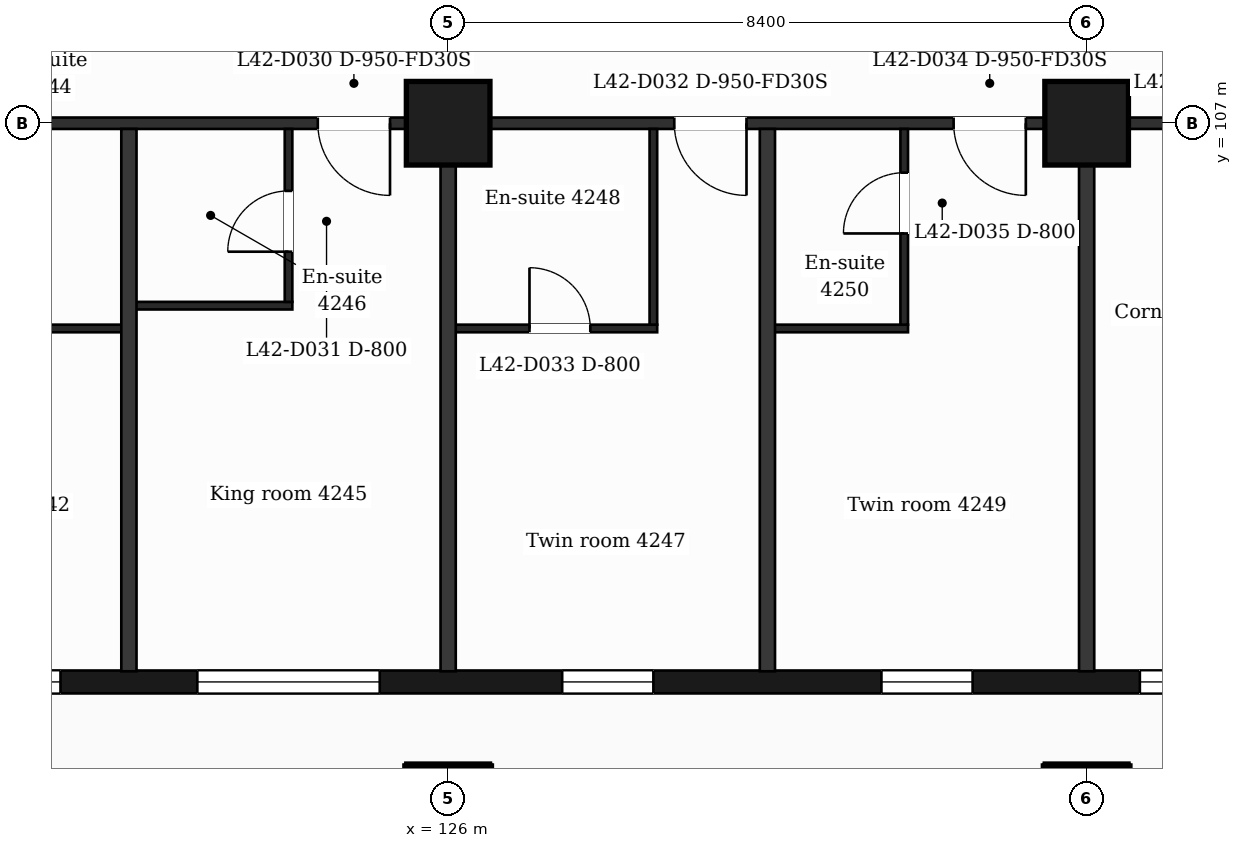
"""IFC4 building model, lengths in metres.
Left out: names, types, materials, properties, quantities, classifications, styles, units other than length and angle.
Written with IfcOpenShell. Run it as: python <this file> out.ifc"""

import sys

from ifc_helpers import new_model, si_unit, direction, frame, frame_2d, origin, origin_2d, place, context, subcontext, project, spatial, rectangle, extrude, element, fill, save


model = new_model("IFC4")
c1 = context("Model", 3, precision=1e-05, world=origin(), true_north=direction((0.0, 1.0)))
c2 = subcontext(c1, "Body", "Model", "MODEL_VIEW")
j1 = project(units=[si_unit("LENGTHUNIT", "METRE"), si_unit("PLANEANGLEUNIT", "RADIAN")], contexts=[c1])
p1 = place(None, origin())
s1 = spatial("IfcSite", under=j1, at=p1, CompositionType="ELEMENT")
p2 = place(p1, origin())
s2 = spatial("IfcBuilding", under=s1, at=p2, CompositionType="ELEMENT")
p3 = place(p2, frame((0.0, 0.0, 177.4)))
s3 = spatial("IfcBuildingStorey", under=s2, at=p3, CompositionType="ELEMENT", Elevation=177.4)
for number, where, z_axis, x_axis in (
    (1, (126.0, 98.0, 0.0), (0.0, 0.0, 1.0), (1.0, 0.0, 0.0)),
    (2, (134.4, 98.0, 0.0), (0.0, 0.0, 1.0), (1.0, 0.0, 0.0)),
    (3, (126.0, 107.0, 0.0), (0.0, 0.0, 1.0), (1.0, 0.0, 0.0)),
    (4, (134.4, 107.0, 0.0), (0.0, 0.0, 1.0), (1.0, 0.0, 0.0)),
):
    element("IfcColumn", number, at=place(p3, frame(where, z_axis=z_axis, x_axis=x_axis)), inside=s3, PredefinedType="COLUMN", context=c2, shape_type="SweptSolid", body=[
        extrude(rectangle(XDim=1.1, YDim=1.1, at=origin_2d()), origin(), (0.0, 0.0, 1.0), 3.7),
    ])
p4 = place(p3, frame((89.85, 99.65, 0.0), z_axis=(0.0, 0.0, 1.0), x_axis=(1.0, 0.0, 0.0)))
e5 = element("IfcWall", 5, at=p4, inside=s3, PredefinedType="SOLIDWALL", context=c2, shape_type="SweptSolid", body=[
    extrude(rectangle(XDim=47.25, YDim=0.3, at=frame_2d((23.625, 0.0))), origin(), (0.0, 0.0, 1.0), 3.38),
])
p5 = place(p4, frame((0.725, 0.0, 0.9)))
e6 = element("IfcOpeningElement", 6, at=p5, cuts=e5, PredefinedType="OPENING", context=c2, shape_type="SweptSolid", body=[
    extrude(rectangle(XDim=1.2, YDim=2.1, at=frame_2d((0.6, 1.05))), frame((0.0, 0.16, 0.0), z_axis=(0.0, -1.0, 0.0), x_axis=(1.0, 0.0, 0.0)), (0.0, 0.0, 1.0), 0.32),
])
p6 = place(p4, frame((3.45, 0.0, 0.9)))
e7 = element("IfcOpeningElement", 7, at=p6, cuts=e5, PredefinedType="OPENING", context=c2, shape_type="SweptSolid", body=[
    extrude(rectangle(XDim=2.4, YDim=2.1, at=frame_2d((1.2, 1.05))), frame((0.0, 0.16, 0.0), z_axis=(0.0, -1.0, 0.0), x_axis=(1.0, 0.0, 0.0)), (0.0, 0.0, 1.0), 0.32),
])
p7 = place(p4, frame((8.25, 0.0, 0.9)))
e8 = element("IfcOpeningElement", 8, at=p7, cuts=e5, PredefinedType="OPENING", context=c2, shape_type="SweptSolid", body=[
    extrude(rectangle(XDim=1.2, YDim=2.1, at=frame_2d((0.6, 1.05))), frame((0.0, 0.16, 0.0), z_axis=(0.0, -1.0, 0.0), x_axis=(1.0, 0.0, 0.0)), (0.0, 0.0, 1.0), 0.32),
])
p8 = place(p4, frame((12.45, 0.0, 0.9)))
e9 = element("IfcOpeningElement", 9, at=p8, cuts=e5, PredefinedType="OPENING", context=c2, shape_type="SweptSolid", body=[
    extrude(rectangle(XDim=1.2, YDim=2.1, at=frame_2d((0.6, 1.05))), frame((0.0, 0.16, 0.0), z_axis=(0.0, -1.0, 0.0), x_axis=(1.0, 0.0, 0.0)), (0.0, 0.0, 1.0), 0.32),
])
p9 = place(p4, frame((16.05, 0.0, 0.9)))
e10 = element("IfcOpeningElement", 10, at=p9, cuts=e5, PredefinedType="OPENING", context=c2, shape_type="SweptSolid", body=[
    extrude(rectangle(XDim=2.4, YDim=2.1, at=frame_2d((1.2, 1.05))), frame((0.0, 0.16, 0.0), z_axis=(0.0, -1.0, 0.0), x_axis=(1.0, 0.0, 0.0)), (0.0, 0.0, 1.0), 0.32),
])
p10 = place(p4, frame((20.25, 0.0, 0.9)))
e11 = element("IfcOpeningElement", 11, at=p10, cuts=e5, PredefinedType="OPENING", context=c2, shape_type="SweptSolid", body=[
    extrude(rectangle(XDim=2.4, YDim=2.1, at=frame_2d((1.2, 1.05))), frame((0.0, 0.16, 0.0), z_axis=(0.0, -1.0, 0.0), x_axis=(1.0, 0.0, 0.0)), (0.0, 0.0, 1.0), 0.32),
])
p11 = place(p4, frame((25.05, 0.0, 0.0)))
e12 = element("IfcOpeningElement", 12, at=p11, cuts=e5, PredefinedType="OPENING", context=c2, shape_type="SweptSolid", body=[
    extrude(rectangle(XDim=1.2, YDim=2.4, at=frame_2d((0.6, 1.2))), frame((0.0, 0.16, 0.0), z_axis=(0.0, -1.0, 0.0), x_axis=(1.0, 0.0, 0.0)), (0.0, 0.0, 1.0), 0.32),
])
p12 = place(p4, frame((28.65, 0.0, 0.9)))
e13 = element("IfcOpeningElement", 13, at=p12, cuts=e5, PredefinedType="OPENING", context=c2, shape_type="SweptSolid", body=[
    extrude(rectangle(XDim=2.4, YDim=2.1, at=frame_2d((1.2, 1.05))), frame((0.0, 0.16, 0.0), z_axis=(0.0, -1.0, 0.0), x_axis=(1.0, 0.0, 0.0)), (0.0, 0.0, 1.0), 0.32),
])
p13 = place(p4, frame((32.85, 0.0, 0.9)))
e14 = element("IfcOpeningElement", 14, at=p13, cuts=e5, PredefinedType="OPENING", context=c2, shape_type="SweptSolid", body=[
    extrude(rectangle(XDim=2.4, YDim=2.1, at=frame_2d((1.2, 1.05))), frame((0.0, 0.16, 0.0), z_axis=(0.0, -1.0, 0.0), x_axis=(1.0, 0.0, 0.0)), (0.0, 0.0, 1.0), 0.32),
])
p14 = place(p4, frame((37.65, 0.0, 0.9)))
e15 = element("IfcOpeningElement", 15, at=p14, cuts=e5, PredefinedType="OPENING", context=c2, shape_type="SweptSolid", body=[
    extrude(rectangle(XDim=1.2, YDim=2.1, at=frame_2d((0.6, 1.05))), frame((0.0, 0.16, 0.0), z_axis=(0.0, -1.0, 0.0), x_axis=(1.0, 0.0, 0.0)), (0.0, 0.0, 1.0), 0.32),
])
p15 = place(p4, frame((41.85, 0.0, 0.9)))
e16 = element("IfcOpeningElement", 16, at=p15, cuts=e5, PredefinedType="OPENING", context=c2, shape_type="SweptSolid", body=[
    extrude(rectangle(XDim=1.2, YDim=2.1, at=frame_2d((0.6, 1.05))), frame((0.0, 0.16, 0.0), z_axis=(0.0, -1.0, 0.0), x_axis=(1.0, 0.0, 0.0)), (0.0, 0.0, 1.0), 0.32),
])
p16 = place(p4, frame((45.25, 0.0, 0.9)))
e17 = element("IfcOpeningElement", 17, at=p16, cuts=e5, PredefinedType="OPENING", context=c2, shape_type="SweptSolid", body=[
    extrude(rectangle(XDim=1.2, YDim=2.1, at=frame_2d((0.6, 1.05))), frame((0.0, 0.16, 0.0), z_axis=(0.0, -1.0, 0.0), x_axis=(1.0, 0.0, 0.0)), (0.0, 0.0, 1.0), 0.32),
])
p17 = place(p3, frame((119.65, 104.3, 0.0), z_axis=(0.0, 0.0, 1.0), x_axis=(1.0, 0.0, 0.0)))
e18 = element("IfcWall", 18, at=p17, inside=s3, PredefinedType="PARTITIONING", context=c2, shape_type="SweptSolid", body=[
    extrude(rectangle(XDim=2.15, YDim=0.1, at=frame_2d((1.075, 0.0))), origin(), (0.0, 0.0, 1.0), 3.38),
])
p18 = place(p3, frame((126.0, 104.3, 0.0), z_axis=(0.0, 0.0, 1.0), x_axis=(1.0, 0.0, 0.0)))
e19 = element("IfcWall", 19, at=p18, inside=s3, PredefinedType="PARTITIONING", context=c2, shape_type="SweptSolid", body=[
    extrude(rectangle(XDim=2.75, YDim=0.1, at=frame_2d((1.375, 0.0))), origin(), (0.0, 0.0, 1.0), 3.38),
])
p19 = place(p18, frame((1.07, 0.0, 0.0)))
e20 = element("IfcOpeningElement", 20, at=p19, cuts=e19, PredefinedType="OPENING", context=c2, shape_type="SweptSolid", body=[
    extrude(rectangle(XDim=0.8, YDim=2.1, at=frame_2d((0.4, 1.05))), frame((0.0, 0.06, 0.0), z_axis=(0.0, -1.0, 0.0), x_axis=(1.0, 0.0, 0.0)), (0.0, 0.0, 1.0), 0.12),
])
p20 = place(p3, frame((130.2, 104.3, 0.0), z_axis=(0.0, 0.0, 1.0), x_axis=(1.0, 0.0, 0.0)))
e21 = element("IfcWall", 21, at=p20, inside=s3, PredefinedType="PARTITIONING", context=c2, shape_type="SweptSolid", body=[
    extrude(rectangle(XDim=1.85, YDim=0.1, at=frame_2d((0.925, 0.0))), origin(), (0.0, 0.0, 1.0), 3.38),
])
p21 = place(p3, frame((121.8, 104.6, 0.0), z_axis=(0.0, 0.0, 1.0), x_axis=(1.0, 0.0, 0.0)))
e22 = element("IfcWall", 22, at=p21, inside=s3, PredefinedType="PARTITIONING", context=c2, shape_type="SweptSolid", body=[
    extrude(rectangle(XDim=2.15, YDim=0.1, at=frame_2d((1.075, 0.0))), origin(), (0.0, 0.0, 1.0), 3.38),
])
p22 = place(p3, frame((87.018, 107.0, 0.0), z_axis=(0.0, 0.0, 1.0), x_axis=(1.0, 0.0, 0.0)))
e23 = element("IfcWall", 23, at=p22, inside=s3, PredefinedType="PARTITIONING", context=c2, shape_type="SweptSolid", body=[
    extrude(rectangle(XDim=52.765, YDim=0.15, at=frame_2d((26.382, 0.0))), origin(), (0.0, 0.0, 1.0), 3.38),
])
p23 = place(p22, frame((1.276, 0.0, 0.0)))
e24 = element("IfcOpeningElement", 24, at=p23, cuts=e23, PredefinedType="OPENING", context=c2, shape_type="SweptSolid", body=[
    extrude(rectangle(XDim=0.95, YDim=2.1, at=frame_2d((0.475, 1.05))), frame((0.0, 0.085, 0.0), z_axis=(0.0, -1.0, 0.0), x_axis=(1.0, 0.0, 0.0)), (0.0, 0.0, 1.0), 0.17),
])
p24 = place(p22, frame((8.357, 0.0, 0.0)))
e25 = element("IfcOpeningElement", 25, at=p24, cuts=e23, PredefinedType="OPENING", context=c2, shape_type="SweptSolid", body=[
    extrude(rectangle(XDim=0.95, YDim=2.1, at=frame_2d((0.475, 1.05))), frame((0.0, 0.085, 0.0), z_axis=(0.0, -1.0, 0.0), x_axis=(1.0, 0.0, 0.0)), (0.0, 0.0, 1.0), 0.17),
])
p25 = place(p22, frame((9.832, 0.0, 0.0)))
e26 = element("IfcOpeningElement", 26, at=p25, cuts=e23, PredefinedType="OPENING", context=c2, shape_type="SweptSolid", body=[
    extrude(rectangle(XDim=1.0, YDim=2.1, at=frame_2d((0.5, 1.05))), frame((0.0, 0.085, 0.0), z_axis=(0.0, -1.0, 0.0), x_axis=(1.0, 0.0, 0.0)), (0.0, 0.0, 1.0), 0.17),
])
p26 = place(p22, frame((14.547, 0.0, 0.0)))
e27 = element("IfcOpeningElement", 27, at=p26, cuts=e23, PredefinedType="OPENING", context=c2, shape_type="SweptSolid", body=[
    extrude(rectangle(XDim=0.95, YDim=2.1, at=frame_2d((0.475, 1.05))), frame((0.0, 0.085, 0.0), z_axis=(0.0, -1.0, 0.0), x_axis=(1.0, 0.0, 0.0)), (0.0, 0.0, 1.0), 0.17),
])
p27 = place(p22, frame((18.257, 0.0, 0.0)))
e28 = element("IfcOpeningElement", 28, at=p27, cuts=e23, PredefinedType="OPENING", context=c2, shape_type="SweptSolid", body=[
    extrude(rectangle(XDim=0.95, YDim=2.1, at=frame_2d((0.475, 1.05))), frame((0.0, 0.085, 0.0), z_axis=(0.0, -1.0, 0.0), x_axis=(1.0, 0.0, 0.0)), (0.0, 0.0, 1.0), 0.17),
])
p28 = place(p22, frame((25.212, 0.0, 0.0)))
e29 = element("IfcOpeningElement", 29, at=p28, cuts=e23, PredefinedType="OPENING", context=c2, shape_type="SweptSolid", body=[
    extrude(rectangle(XDim=1.0, YDim=2.1, at=frame_2d((0.5, 1.05))), frame((0.0, 0.085, 0.0), z_axis=(0.0, -1.0, 0.0), x_axis=(1.0, 0.0, 0.0)), (0.0, 0.0, 1.0), 0.17),
])
p29 = place(p22, frame((37.267, 0.0, 0.0)))
e30 = element("IfcOpeningElement", 30, at=p29, cuts=e23, PredefinedType="OPENING", context=c2, shape_type="SweptSolid", body=[
    extrude(rectangle(XDim=0.95, YDim=2.1, at=frame_2d((0.475, 1.05))), frame((0.0, 0.085, 0.0), z_axis=(0.0, -1.0, 0.0), x_axis=(1.0, 0.0, 0.0)), (0.0, 0.0, 1.0), 0.17),
])
p30 = place(p22, frame((41.957, 0.0, 0.0)))
e31 = element("IfcOpeningElement", 31, at=p30, cuts=e23, PredefinedType="OPENING", context=c2, shape_type="SweptSolid", body=[
    extrude(rectangle(XDim=0.95, YDim=2.1, at=frame_2d((0.475, 1.05))), frame((0.0, 0.085, 0.0), z_axis=(0.0, -1.0, 0.0), x_axis=(1.0, 0.0, 0.0)), (0.0, 0.0, 1.0), 0.17),
])
p31 = place(p22, frame((45.632, 0.0, 0.0)))
e32 = element("IfcOpeningElement", 32, at=p31, cuts=e23, PredefinedType="OPENING", context=c2, shape_type="SweptSolid", body=[
    extrude(rectangle(XDim=0.95, YDim=2.1, at=frame_2d((0.475, 1.05))), frame((0.0, 0.085, 0.0), z_axis=(0.0, -1.0, 0.0), x_axis=(1.0, 0.0, 0.0)), (0.0, 0.0, 1.0), 0.17),
])
p32 = place(p22, frame((48.767, 0.0, 0.0)))
e33 = element("IfcOpeningElement", 33, at=p32, cuts=e23, PredefinedType="OPENING", context=c2, shape_type="SweptSolid", body=[
    extrude(rectangle(XDim=0.95, YDim=2.1, at=frame_2d((0.475, 1.05))), frame((0.0, 0.085, 0.0), z_axis=(0.0, -1.0, 0.0), x_axis=(1.0, 0.0, 0.0)), (0.0, 0.0, 1.0), 0.17),
])
p33 = place(p3, frame((121.8, 99.79, 0.0), z_axis=(0.0, 0.0, 1.0), x_axis=(0.0, 1.0, 0.0)))
e34 = element("IfcWall", 34, at=p33, inside=s3, PredefinedType="PARTITIONING", context=c2, shape_type="SweptSolid", body=[
    extrude(rectangle(XDim=7.135, YDim=0.2, at=frame_2d((3.567, 0.0))), origin(), (0.0, 0.0, 1.0), 3.38),
])
p34 = place(p3, frame((123.9, 104.65, 0.0), z_axis=(0.0, 0.0, 1.0), x_axis=(0.0, 1.0, 0.0)))
e35 = element("IfcWall", 35, at=p34, inside=s3, PredefinedType="PARTITIONING", context=c2, shape_type="SweptSolid", body=[
    extrude(rectangle(XDim=2.275, YDim=0.1, at=frame_2d((1.138, 0.0))), origin(), (0.0, 0.0, 1.0), 3.38),
])
p35 = place(p34, frame((0.66, 0.0, 0.0)))
e36 = element("IfcOpeningElement", 36, at=p35, cuts=e35, PredefinedType="OPENING", context=c2, shape_type="SweptSolid", body=[
    extrude(rectangle(XDim=0.8, YDim=2.1, at=frame_2d((0.4, 1.05))), frame((0.0, 0.06, 0.0), z_axis=(0.0, -1.0, 0.0), x_axis=(1.0, 0.0, 0.0)), (0.0, 0.0, 1.0), 0.12),
])
p36 = place(p3, frame((126.0, 99.79, 0.0), z_axis=(0.0, 0.0, 1.0), x_axis=(0.0, 1.0, 0.0)))
e37 = element("IfcWall", 37, at=p36, inside=s3, PredefinedType="PARTITIONING", context=c2, shape_type="SweptSolid", body=[
    extrude(rectangle(XDim=7.135, YDim=0.2, at=frame_2d((3.567, 0.0))), origin(), (0.0, 0.0, 1.0), 3.38),
])
p37 = place(p3, frame((128.7, 104.35, 0.0), z_axis=(0.0, 0.0, 1.0), x_axis=(0.0, 1.0, 0.0)))
e38 = element("IfcWall", 38, at=p37, inside=s3, PredefinedType="PARTITIONING", context=c2, shape_type="SweptSolid", body=[
    extrude(rectangle(XDim=2.575, YDim=0.1, at=frame_2d((1.288, 0.0))), origin(), (0.0, 0.0, 1.0), 3.38),
])
p38 = place(p3, frame((130.2, 99.79, 0.0), z_axis=(0.0, 0.0, 1.0), x_axis=(0.0, 1.0, 0.0)))
e39 = element("IfcWall", 39, at=p38, inside=s3, PredefinedType="PARTITIONING", context=c2, shape_type="SweptSolid", body=[
    extrude(rectangle(XDim=7.135, YDim=0.2, at=frame_2d((3.567, 0.0))), origin(), (0.0, 0.0, 1.0), 3.38),
])
p39 = place(p3, frame((132.0, 104.35, 0.0), z_axis=(0.0, 0.0, 1.0), x_axis=(0.0, 1.0, 0.0)))
e40 = element("IfcWall", 40, at=p39, inside=s3, PredefinedType="PARTITIONING", context=c2, shape_type="SweptSolid", body=[
    extrude(rectangle(XDim=2.575, YDim=0.1, at=frame_2d((1.288, 0.0))), origin(), (0.0, 0.0, 1.0), 3.38),
])
p40 = place(p39, frame((1.2, 0.0, 0.0)))
e41 = element("IfcOpeningElement", 41, at=p40, cuts=e40, PredefinedType="OPENING", context=c2, shape_type="SweptSolid", body=[
    extrude(rectangle(XDim=0.8, YDim=2.1, at=frame_2d((0.4, 1.05))), frame((0.0, 0.06, 0.0), z_axis=(0.0, -1.0, 0.0), x_axis=(1.0, 0.0, 0.0)), (0.0, 0.0, 1.0), 0.12),
])
p41 = place(p3, frame((134.4, 99.79, 0.0), z_axis=(0.0, 0.0, 1.0), x_axis=(0.0, 1.0, 0.0)))
e42 = element("IfcWall", 42, at=p41, inside=s3, PredefinedType="PARTITIONING", context=c2, shape_type="SweptSolid", body=[
    extrude(rectangle(XDim=7.135, YDim=0.2, at=frame_2d((3.567, 0.0))), origin(), (0.0, 0.0, 1.0), 3.38),
])
p42 = place(p12, origin())
e43 = element("IfcWindow", 43, at=p42, inside=s3, PartitioningType="SINGLE_PANEL", PredefinedType="WINDOW", context=c2, shape_type="SweptSolid", body=[
    extrude(rectangle(XDim=2.4, YDim=2.1, at=frame_2d((1.2, 1.05))), frame((0.0, 0.03, 0.0), z_axis=(0.0, -1.0, 0.0), x_axis=(1.0, 0.0, 0.0)), (0.0, 0.0, 1.0), 0.06),
])
fill(e13, e43)
p43 = place(p13, origin())
e44 = element("IfcWindow", 44, at=p43, inside=s3, PartitioningType="SINGLE_PANEL", PredefinedType="WINDOW", context=c2, shape_type="SweptSolid", body=[
    extrude(rectangle(XDim=2.4, YDim=2.1, at=frame_2d((1.2, 1.05))), frame((0.0, 0.03, 0.0), z_axis=(0.0, -1.0, 0.0), x_axis=(1.0, 0.0, 0.0)), (0.0, 0.0, 1.0), 0.06),
])
fill(e14, e44)
p44 = place(p14, origin())
e45 = element("IfcWindow", 45, at=p44, inside=s3, PartitioningType="SINGLE_PANEL", PredefinedType="WINDOW", context=c2, shape_type="SweptSolid", body=[
    extrude(rectangle(XDim=1.2, YDim=2.1, at=frame_2d((0.6, 1.05))), frame((0.0, 0.03, 0.0), z_axis=(0.0, -1.0, 0.0), x_axis=(1.0, 0.0, 0.0)), (0.0, 0.0, 1.0), 0.06),
])
fill(e15, e45)
p45 = place(p15, origin())
e46 = element("IfcWindow", 46, at=p45, inside=s3, PartitioningType="SINGLE_PANEL", PredefinedType="WINDOW", context=c2, shape_type="SweptSolid", body=[
    extrude(rectangle(XDim=1.2, YDim=2.1, at=frame_2d((0.6, 1.05))), frame((0.0, 0.03, 0.0), z_axis=(0.0, -1.0, 0.0), x_axis=(1.0, 0.0, 0.0)), (0.0, 0.0, 1.0), 0.06),
])
fill(e16, e46)
p46 = place(p16, origin())
e47 = element("IfcWindow", 47, at=p46, inside=s3, PartitioningType="SINGLE_PANEL", PredefinedType="WINDOW", context=c2, shape_type="SweptSolid", body=[
    extrude(rectangle(XDim=1.2, YDim=2.1, at=frame_2d((0.6, 1.05))), frame((0.0, 0.03, 0.0), z_axis=(0.0, -1.0, 0.0), x_axis=(1.0, 0.0, 0.0)), (0.0, 0.0, 1.0), 0.06),
])
fill(e17, e47)
p47 = place(p29, origin())
e48 = element("IfcDoor", 48, at=p47, inside=s3, OperationType="SINGLE_SWING_RIGHT", PredefinedType="DOOR", context=c2, shape_type="SweptSolid", body=[
    extrude(rectangle(XDim=0.95, YDim=2.1, at=frame_2d((0.475, 1.05))), frame((0.0, 0.025, 0.0), z_axis=(0.0, -1.0, 0.0), x_axis=(1.0, 0.0, 0.0)), (0.0, 0.0, 1.0), 0.05),
])
fill(e30, e48)
p48 = place(p35, origin())
e49 = element("IfcDoor", 49, at=p48, inside=s3, OperationType="SINGLE_SWING_LEFT", PredefinedType="DOOR", context=c2, shape_type="SweptSolid", body=[
    extrude(rectangle(XDim=0.8, YDim=2.1, at=frame_2d((0.4, 1.05))), frame((0.0, 0.025, 0.0), z_axis=(0.0, -1.0, 0.0), x_axis=(1.0, 0.0, 0.0)), (0.0, 0.0, 1.0), 0.05),
])
fill(e36, e49)
p49 = place(p30, origin())
e50 = element("IfcDoor", 50, at=p49, inside=s3, OperationType="SINGLE_SWING_RIGHT", PredefinedType="DOOR", context=c2, shape_type="SweptSolid", body=[
    extrude(rectangle(XDim=0.95, YDim=2.1, at=frame_2d((0.475, 1.05))), frame((0.0, 0.025, 0.0), z_axis=(0.0, -1.0, 0.0), x_axis=(1.0, 0.0, 0.0)), (0.0, 0.0, 1.0), 0.05),
])
fill(e31, e50)
p50 = place(p19, origin())
e51 = element("IfcDoor", 51, at=p50, inside=s3, OperationType="SINGLE_SWING_LEFT", PredefinedType="DOOR", context=c2, shape_type="SweptSolid", body=[
    extrude(rectangle(XDim=0.8, YDim=2.1, at=frame_2d((0.4, 1.05))), frame((0.0, 0.025, 0.0), z_axis=(0.0, -1.0, 0.0), x_axis=(1.0, 0.0, 0.0)), (0.0, 0.0, 1.0), 0.05),
])
fill(e20, e51)
p51 = place(p31, origin())
e52 = element("IfcDoor", 52, at=p51, inside=s3, OperationType="SINGLE_SWING_RIGHT", PredefinedType="DOOR", context=c2, shape_type="SweptSolid", body=[
    extrude(rectangle(XDim=0.95, YDim=2.1, at=frame_2d((0.475, 1.05))), frame((0.0, 0.025, 0.0), z_axis=(0.0, -1.0, 0.0), x_axis=(1.0, 0.0, 0.0)), (0.0, 0.0, 1.0), 0.05),
])
fill(e32, e52)
p52 = place(p40, origin())
e53 = element("IfcDoor", 53, at=p52, inside=s3, OperationType="SINGLE_SWING_LEFT", PredefinedType="DOOR", context=c2, shape_type="SweptSolid", body=[
    extrude(rectangle(XDim=0.8, YDim=2.1, at=frame_2d((0.4, 1.05))), frame((0.0, 0.025, 0.0), z_axis=(0.0, -1.0, 0.0), x_axis=(1.0, 0.0, 0.0)), (0.0, 0.0, 1.0), 0.05),
])
fill(e41, e53)
save(model, sys.argv[1])
